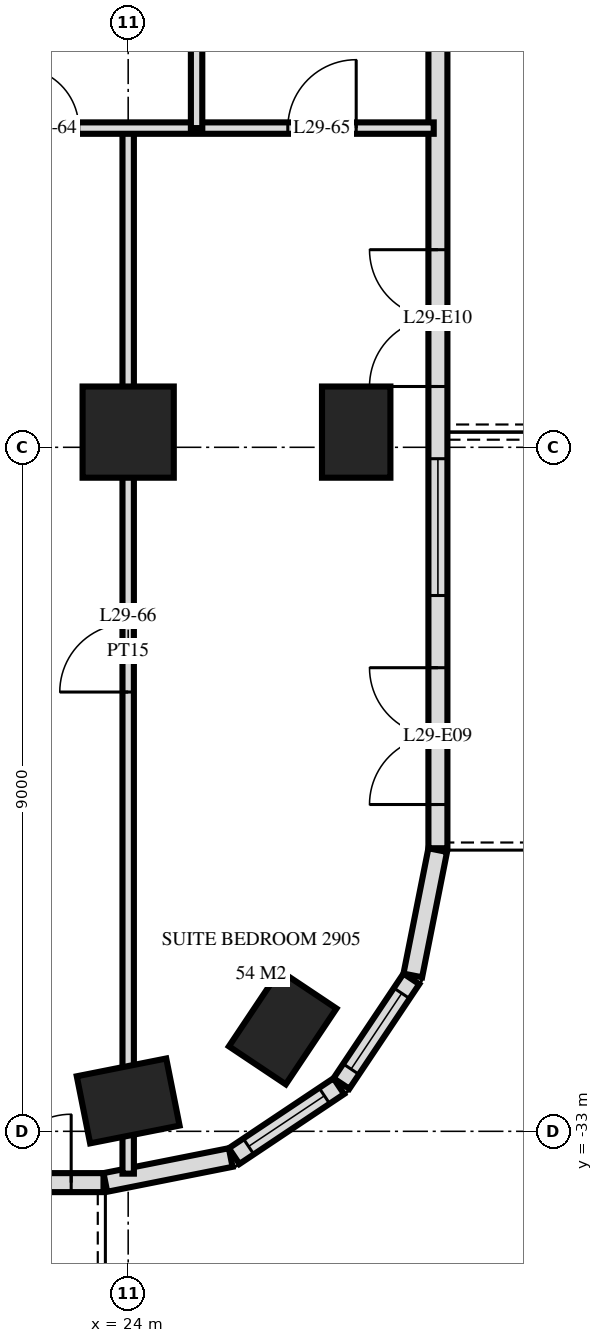
"""IFC4 building model, lengths in metres.
Left out: names, types, materials, properties, quantities, classifications, styles, units other than length and angle.
Written with IfcOpenShell. Run it as: python <this file> out.ifc"""

import sys

from ifc_helpers import new_model, si_unit, direction, frame, frame_2d, origin, origin_2d, place, context, subcontext, project, spatial, rectangle, extrude, element, fill, save


model = new_model("IFC4")
c1 = context("Model", 3, precision=1e-05, world=origin(), true_north=direction((0.0, 1.0)))
c2 = subcontext(c1, "Body", "Model", "MODEL_VIEW")
j1 = project(units=[si_unit("LENGTHUNIT", "METRE"), si_unit("PLANEANGLEUNIT", "RADIAN")], contexts=[c1])
p1 = place(None, origin())
s1 = spatial("IfcSite", under=j1, at=p1, CompositionType="ELEMENT")
p2 = place(p1, origin())
s2 = spatial("IfcBuilding", under=s1, at=p2, CompositionType="ELEMENT")
p3 = place(p2, frame((0.0, 0.0, 116.4)))
s3 = spatial("IfcBuildingStorey", under=s2, at=p3, CompositionType="ELEMENT", Elevation=116.4)
p4 = place(p3, frame((24.0, -32.6, 0.0), z_axis=(0.0, 0.0, 1.0), x_axis=(0.980792089743, 0.195056086032, 0.0)))
e1 = element("IfcColumn", 1, at=p4, inside=s3, PredefinedType="COLUMN", context=c2, shape_type="SweptSolid", body=[
    extrude(rectangle(XDim=1.2, YDim=0.9, at=origin_2d()), origin(), (0.0, 0.0, 1.0), 3.6),
])
p5 = place(p3, frame((24.0, -23.8, 0.0), z_axis=(0.0, 0.0, 1.0), x_axis=(1.0, 0.0, 0.0)))
e2 = element("IfcColumn", 2, at=p5, inside=s3, PredefinedType="COLUMN", context=c2, shape_type="SweptSolid", body=[
    extrude(rectangle(XDim=1.2, YDim=1.2, at=origin_2d()), origin(), (0.0, 0.0, 1.0), 3.6),
])
for number, where, z_axis, x_axis in (
    (3, (26.033, -31.633, 0.0), (0.0, 0.0, 1.0), (0.556, 0.831, 0.0)),
    (4, (27.0, -23.8, 0.0), (0.0, 0.0, 1.0), (0.0, 1.0, 0.0)),
):
    element("IfcColumn", number, at=place(p3, frame(where, z_axis=z_axis, x_axis=x_axis)), inside=s3, PredefinedType="COLUMN", context=c2, shape_type="SweptSolid", body=[
        extrude(rectangle(XDim=1.2, YDim=0.9, at=origin_2d()), origin(), (0.0, 0.0, 1.0), 3.6),
    ])
p6 = place(p3, frame((-23.675, -33.675, 0.0), z_axis=(0.0, 0.0, 1.0), x_axis=(1.0, 0.0, 0.0)))
e5 = element("IfcWall", 5, at=p6, inside=s3, PredefinedType="SOLIDWALL", context=c2, shape_type="SweptSolid", body=[
    extrude(rectangle(XDim=47.351, YDim=0.25, at=frame_2d((23.675, 0.0))), origin(), (0.0, 0.0, 1.0), 3.32),
])
p7 = place(p6, frame((0.275, 0.0, 0.3)))
e6 = element("IfcOpeningElement", 6, at=p7, cuts=e5, PredefinedType="OPENING", context=c2, shape_type="SweptSolid", body=[
    extrude(rectangle(XDim=2.4, YDim=2.1, at=frame_2d((1.2, 1.05))), frame((0.0, 0.135, 0.0), z_axis=(0.0, -1.0, 0.0), x_axis=(1.0, 0.0, 0.0)), (0.0, 0.0, 1.0), 0.27),
])
p8 = place(p6, frame((3.425, 0.0, 0.0)))
e7 = element("IfcOpeningElement", 7, at=p8, cuts=e5, PredefinedType="OPENING", context=c2, shape_type="SweptSolid", body=[
    extrude(rectangle(XDim=1.8, YDim=2.4, at=frame_2d((0.9, 1.2))), frame((0.0, 0.135, 0.0), z_axis=(0.0, -1.0, 0.0), x_axis=(1.0, 0.0, 0.0)), (0.0, 0.0, 1.0), 0.27),
])
p9 = place(p6, frame((5.975, 0.0, 0.3)))
e8 = element("IfcOpeningElement", 8, at=p9, cuts=e5, PredefinedType="OPENING", context=c2, shape_type="SweptSolid", body=[
    extrude(rectangle(XDim=2.4, YDim=2.1, at=frame_2d((1.2, 1.05))), frame((0.0, 0.135, 0.0), z_axis=(0.0, -1.0, 0.0), x_axis=(1.0, 0.0, 0.0)), (0.0, 0.0, 1.0), 0.27),
])
p10 = place(p6, frame((9.275, 0.0, 0.0)))
e9 = element("IfcOpeningElement", 9, at=p10, cuts=e5, PredefinedType="OPENING", context=c2, shape_type="SweptSolid", body=[
    extrude(rectangle(XDim=1.8, YDim=2.4, at=frame_2d((0.9, 1.2))), frame((0.0, 0.135, 0.0), z_axis=(0.0, -1.0, 0.0), x_axis=(1.0, 0.0, 0.0)), (0.0, 0.0, 1.0), 0.27),
])
p11 = place(p6, frame((12.275, 0.0, 0.0)))
e10 = element("IfcOpeningElement", 10, at=p11, cuts=e5, PredefinedType="OPENING", context=c2, shape_type="SweptSolid", body=[
    extrude(rectangle(XDim=1.8, YDim=2.4, at=frame_2d((0.9, 1.2))), frame((0.0, 0.135, 0.0), z_axis=(0.0, -1.0, 0.0), x_axis=(1.0, 0.0, 0.0)), (0.0, 0.0, 1.0), 0.27),
])
p12 = place(p6, frame((14.975, 0.0, 0.3)))
e11 = element("IfcOpeningElement", 11, at=p12, cuts=e5, PredefinedType="OPENING", context=c2, shape_type="SweptSolid", body=[
    extrude(rectangle(XDim=2.4, YDim=2.1, at=frame_2d((1.2, 1.05))), frame((0.0, 0.135, 0.0), z_axis=(0.0, -1.0, 0.0), x_axis=(1.0, 0.0, 0.0)), (0.0, 0.0, 1.0), 0.27),
])
p13 = place(p6, frame((17.975, 0.0, 0.3)))
e12 = element("IfcOpeningElement", 12, at=p13, cuts=e5, PredefinedType="OPENING", context=c2, shape_type="SweptSolid", body=[
    extrude(rectangle(XDim=2.4, YDim=2.1, at=frame_2d((1.2, 1.05))), frame((0.0, 0.135, 0.0), z_axis=(0.0, -1.0, 0.0), x_axis=(1.0, 0.0, 0.0)), (0.0, 0.0, 1.0), 0.27),
])
p14 = place(p6, frame((21.275, 0.0, 0.0)))
e13 = element("IfcOpeningElement", 13, at=p14, cuts=e5, PredefinedType="OPENING", context=c2, shape_type="SweptSolid", body=[
    extrude(rectangle(XDim=1.8, YDim=2.4, at=frame_2d((0.9, 1.2))), frame((0.0, 0.135, 0.0), z_axis=(0.0, -1.0, 0.0), x_axis=(1.0, 0.0, 0.0)), (0.0, 0.0, 1.0), 0.27),
])
p15 = place(p6, frame((24.275, 0.0, 0.0)))
e14 = element("IfcOpeningElement", 14, at=p15, cuts=e5, PredefinedType="OPENING", context=c2, shape_type="SweptSolid", body=[
    extrude(rectangle(XDim=1.8, YDim=2.4, at=frame_2d((0.9, 1.2))), frame((0.0, 0.135, 0.0), z_axis=(0.0, -1.0, 0.0), x_axis=(1.0, 0.0, 0.0)), (0.0, 0.0, 1.0), 0.27),
])
p16 = place(p6, frame((26.975, 0.0, 0.3)))
e15 = element("IfcOpeningElement", 15, at=p16, cuts=e5, PredefinedType="OPENING", context=c2, shape_type="SweptSolid", body=[
    extrude(rectangle(XDim=2.4, YDim=2.1, at=frame_2d((1.2, 1.05))), frame((0.0, 0.135, 0.0), z_axis=(0.0, -1.0, 0.0), x_axis=(1.0, 0.0, 0.0)), (0.0, 0.0, 1.0), 0.27),
])
p17 = place(p6, frame((30.275, 0.0, 0.0)))
e16 = element("IfcOpeningElement", 16, at=p17, cuts=e5, PredefinedType="OPENING", context=c2, shape_type="SweptSolid", body=[
    extrude(rectangle(XDim=1.8, YDim=2.4, at=frame_2d((0.9, 1.2))), frame((0.0, 0.135, 0.0), z_axis=(0.0, -1.0, 0.0), x_axis=(1.0, 0.0, 0.0)), (0.0, 0.0, 1.0), 0.27),
])
p18 = place(p6, frame((32.975, 0.0, 0.3)))
e17 = element("IfcOpeningElement", 17, at=p18, cuts=e5, PredefinedType="OPENING", context=c2, shape_type="SweptSolid", body=[
    extrude(rectangle(XDim=2.4, YDim=2.1, at=frame_2d((1.2, 1.05))), frame((0.0, 0.135, 0.0), z_axis=(0.0, -1.0, 0.0), x_axis=(1.0, 0.0, 0.0)), (0.0, 0.0, 1.0), 0.27),
])
p19 = place(p6, frame((35.975, 0.0, 0.3)))
e18 = element("IfcOpeningElement", 18, at=p19, cuts=e5, PredefinedType="OPENING", context=c2, shape_type="SweptSolid", body=[
    extrude(rectangle(XDim=2.4, YDim=2.1, at=frame_2d((1.2, 1.05))), frame((0.0, 0.135, 0.0), z_axis=(0.0, -1.0, 0.0), x_axis=(1.0, 0.0, 0.0)), (0.0, 0.0, 1.0), 0.27),
])
p20 = place(p6, frame((39.275, 0.0, 0.0)))
e19 = element("IfcOpeningElement", 19, at=p20, cuts=e5, PredefinedType="OPENING", context=c2, shape_type="SweptSolid", body=[
    extrude(rectangle(XDim=1.8, YDim=2.4, at=frame_2d((0.9, 1.2))), frame((0.0, 0.135, 0.0), z_axis=(0.0, -1.0, 0.0), x_axis=(1.0, 0.0, 0.0)), (0.0, 0.0, 1.0), 0.27),
])
p21 = place(p6, frame((41.975, 0.0, 0.3)))
e20 = element("IfcOpeningElement", 20, at=p21, cuts=e5, PredefinedType="OPENING", context=c2, shape_type="SweptSolid", body=[
    extrude(rectangle(XDim=2.4, YDim=2.1, at=frame_2d((1.2, 1.05))), frame((0.0, 0.135, 0.0), z_axis=(0.0, -1.0, 0.0), x_axis=(1.0, 0.0, 0.0)), (0.0, 0.0, 1.0), 0.27),
])
p22 = place(p6, frame((45.125, 0.0, 0.0)))
e21 = element("IfcOpeningElement", 21, at=p22, cuts=e5, PredefinedType="OPENING", context=c2, shape_type="SweptSolid", body=[
    extrude(rectangle(XDim=1.8, YDim=2.4, at=frame_2d((0.9, 1.2))), frame((0.0, 0.135, 0.0), z_axis=(0.0, -1.0, 0.0), x_axis=(1.0, 0.0, 0.0)), (0.0, 0.0, 1.0), 0.27),
])
p23 = place(p3, frame((23.7, -33.673, 0.0), z_axis=(0.0, 0.0, 1.0), x_axis=(0.980775640221, 0.19513878023, 0.0)))
e22 = element("IfcWall", 22, at=p23, inside=s3, PredefinedType="SOLIDWALL", context=c2, shape_type="SweptSolid", body=[
    extrude(rectangle(XDim=1.681, YDim=0.25, at=frame_2d((0.841, 0.0))), origin(), (0.0, 0.0, 1.0), 3.32),
])
p24 = place(p3, frame((25.394, -33.326, 0.0), z_axis=(0.0, 0.0, 1.0), x_axis=(0.831482937015, 0.55555029066, 0.0)))
e23 = element("IfcWall", 23, at=p24, inside=s3, PredefinedType="SOLIDWALL", context=c2, shape_type="SweptSolid", body=[
    extrude(rectangle(XDim=1.656, YDim=0.25, at=frame_2d((0.828, 0.0))), origin(), (0.0, 0.0, 1.0), 3.32),
])
p25 = place(p24, frame((0.228, 0.0, 0.9)))
e24 = element("IfcOpeningElement", 24, at=p25, cuts=e23, PredefinedType="OPENING", context=c2, shape_type="SweptSolid", body=[
    extrude(rectangle(XDim=1.2, YDim=1.5, at=frame_2d((0.6, 0.75))), frame((0.0, 0.135, 0.0), z_axis=(0.0, -1.0, 0.0), x_axis=(1.0, 0.0, 0.0)), (0.0, 0.0, 1.0), 0.27),
])
p26 = place(p3, frame((26.806, -32.371, 0.0), z_axis=(0.0, 0.0, 1.0), x_axis=(0.55555029066, 0.831482937015, 0.0)))
e25 = element("IfcWall", 25, at=p26, inside=s3, PredefinedType="SOLIDWALL", context=c2, shape_type="SweptSolid", body=[
    extrude(rectangle(XDim=1.656, YDim=0.25, at=frame_2d((0.828, 0.0))), origin(), (0.0, 0.0, 1.0), 3.32),
])
p27 = place(p26, frame((0.228, 0.0, 0.9)))
e26 = element("IfcOpeningElement", 26, at=p27, cuts=e25, PredefinedType="OPENING", context=c2, shape_type="SweptSolid", body=[
    extrude(rectangle(XDim=1.2, YDim=1.5, at=frame_2d((0.6, 0.75))), frame((0.0, 0.135, 0.0), z_axis=(0.0, -1.0, 0.0), x_axis=(1.0, 0.0, 0.0)), (0.0, 0.0, 1.0), 0.27),
])
p28 = place(p3, frame((27.745, -30.949, 0.0), z_axis=(0.0, 0.0, 1.0), x_axis=(0.194999110559, 0.980803419081, 0.0)))
e27 = element("IfcWall", 27, at=p28, inside=s3, PredefinedType="SOLIDWALL", context=c2, shape_type="SweptSolid", body=[
    extrude(rectangle(XDim=1.681, YDim=0.25, at=frame_2d((0.841, 0.0))), origin(), (0.0, 0.0, 1.0), 3.32),
])
p29 = place(p3, frame((28.075, -29.275, 0.0), z_axis=(0.0, 0.0, 1.0), x_axis=(0.0, 1.0, 0.0)))
e28 = element("IfcWall", 28, at=p29, inside=s3, PredefinedType="SOLIDWALL", context=c2, shape_type="SweptSolid", body=[
    extrude(rectangle(XDim=25.951, YDim=0.25, at=frame_2d((12.975, 0.0))), origin(), (0.0, 0.0, 1.0), 3.32),
])
p30 = place(p29, frame((0.575, 0.0, 0.0)))
e29 = element("IfcOpeningElement", 29, at=p30, cuts=e28, PredefinedType="OPENING", context=c2, shape_type="SweptSolid", body=[
    extrude(rectangle(XDim=1.8, YDim=2.4, at=frame_2d((0.9, 1.2))), frame((0.0, 0.135, 0.0), z_axis=(0.0, -1.0, 0.0), x_axis=(1.0, 0.0, 0.0)), (0.0, 0.0, 1.0), 0.27),
])
p31 = place(p29, frame((3.325, 0.0, 0.3)))
e30 = element("IfcOpeningElement", 30, at=p31, cuts=e28, PredefinedType="OPENING", context=c2, shape_type="SweptSolid", body=[
    extrude(rectangle(XDim=1.8, YDim=2.1, at=frame_2d((0.9, 1.05))), frame((0.0, 0.135, 0.0), z_axis=(0.0, -1.0, 0.0), x_axis=(1.0, 0.0, 0.0)), (0.0, 0.0, 1.0), 0.27),
])
p32 = place(p29, frame((6.075, 0.0, 0.0)))
e31 = element("IfcOpeningElement", 31, at=p32, cuts=e28, PredefinedType="OPENING", context=c2, shape_type="SweptSolid", body=[
    extrude(rectangle(XDim=1.8, YDim=2.4, at=frame_2d((0.9, 1.2))), frame((0.0, 0.135, 0.0), z_axis=(0.0, -1.0, 0.0), x_axis=(1.0, 0.0, 0.0)), (0.0, 0.0, 1.0), 0.27),
])
p33 = place(p29, frame((17.125, 0.0, 0.0)))
e32 = element("IfcOpeningElement", 32, at=p33, cuts=e28, PredefinedType="OPENING", context=c2, shape_type="SweptSolid", body=[
    extrude(rectangle(XDim=1.8, YDim=2.4, at=frame_2d((0.9, 1.2))), frame((0.0, 0.135, 0.0), z_axis=(0.0, -1.0, 0.0), x_axis=(1.0, 0.0, 0.0)), (0.0, 0.0, 1.0), 0.27),
])
p34 = place(p3, frame((24.9, -19.8, 0.0), z_axis=(0.0, 0.0, 1.0), x_axis=(0.0, 1.0, 0.0)))
e33 = element("IfcWall", 33, at=p34, inside=s3, PredefinedType="PARTITIONING", context=c2, shape_type="SweptSolid", body=[
    extrude(rectangle(XDim=3.0, YDim=0.15, at=frame_2d((1.5, 0.0))), origin(), (0.0, 0.0, 1.0), 3.32),
])
p35 = place(p3, frame((24.0, -33.557, 0.0), z_axis=(0.0, 0.0, 1.0), x_axis=(0.0, 1.0, 0.0)))
e34 = element("IfcWall", 34, at=p35, inside=s3, PredefinedType="PARTITIONING", context=c2, shape_type="SweptSolid", body=[
    extrude(rectangle(XDim=13.757, YDim=0.15, at=frame_2d((6.878, 0.0))), origin(), (0.0, 0.0, 1.0), 3.32),
])
p36 = place(p35, frame((6.337, 0.0, 0.0)))
e35 = element("IfcOpeningElement", 35, at=p36, cuts=e34, PredefinedType="OPENING", context=c2, shape_type="SweptSolid", body=[
    extrude(rectangle(XDim=0.9, YDim=2.1, at=frame_2d((0.45, 1.05))), frame((0.0, 0.085, 0.0), z_axis=(0.0, -1.0, 0.0), x_axis=(1.0, 0.0, 0.0)), (0.0, 0.0, 1.0), 0.17),
])
p37 = place(p3, frame((21.9, -19.8, 0.0), z_axis=(0.0, 0.0, 1.0), x_axis=(1.0, 0.0, 0.0)))
e36 = element("IfcWall", 36, at=p37, inside=s3, PredefinedType="PARTITIONING", context=c2, shape_type="SweptSolid", body=[
    extrude(rectangle(XDim=6.12, YDim=0.15, at=frame_2d((3.06, 0.0))), origin(), (0.0, 0.0, 1.0), 3.32),
])
p38 = place(p37, frame((0.65, 0.0, 0.0)))
e37 = element("IfcOpeningElement", 37, at=p38, cuts=e36, PredefinedType="OPENING", context=c2, shape_type="SweptSolid", body=[
    extrude(rectangle(XDim=0.8, YDim=2.1, at=frame_2d((0.4, 1.05))), frame((0.0, 0.085, 0.0), z_axis=(0.0, -1.0, 0.0), x_axis=(1.0, 0.0, 0.0)), (0.0, 0.0, 1.0), 0.17),
])
p39 = place(p37, frame((4.2, 0.0, 0.0)))
e38 = element("IfcOpeningElement", 38, at=p39, cuts=e36, PredefinedType="OPENING", context=c2, shape_type="SweptSolid", body=[
    extrude(rectangle(XDim=0.9, YDim=2.1, at=frame_2d((0.45, 1.05))), frame((0.0, 0.085, 0.0), z_axis=(0.0, -1.0, 0.0), x_axis=(1.0, 0.0, 0.0)), (0.0, 0.0, 1.0), 0.17),
])
p40 = place(p25, origin())
e39 = element("IfcWindow", 39, at=p40, inside=s3, PartitioningType="SINGLE_PANEL", PredefinedType="WINDOW", context=c2, shape_type="SweptSolid", body=[
    extrude(rectangle(XDim=1.2, YDim=1.5, at=frame_2d((0.6, 0.75))), frame((0.0, 0.03, 0.0), z_axis=(0.0, -1.0, 0.0), x_axis=(1.0, 0.0, 0.0)), (0.0, 0.0, 1.0), 0.06),
])
fill(e24, e39)
p41 = place(p27, origin())
e40 = element("IfcWindow", 40, at=p41, inside=s3, PartitioningType="SINGLE_PANEL", PredefinedType="WINDOW", context=c2, shape_type="SweptSolid", body=[
    extrude(rectangle(XDim=1.2, YDim=1.5, at=frame_2d((0.6, 0.75))), frame((0.0, 0.03, 0.0), z_axis=(0.0, -1.0, 0.0), x_axis=(1.0, 0.0, 0.0)), (0.0, 0.0, 1.0), 0.06),
])
fill(e26, e40)
p42 = place(p22, origin())
e41 = element("IfcDoor", 41, at=p42, inside=s3, OperationType="DOUBLE_DOOR_SINGLE_SWING", PredefinedType="DOOR", context=c2, shape_type="SweptSolid", body=[
    extrude(rectangle(XDim=1.8, YDim=2.4, at=frame_2d((0.9, 1.2))), frame((0.0, 0.025, 0.0), z_axis=(0.0, -1.0, 0.0), x_axis=(1.0, 0.0, 0.0)), (0.0, 0.0, 1.0), 0.05),
])
fill(e21, e41)
p43 = place(p30, origin())
e42 = element("IfcDoor", 42, at=p43, inside=s3, OperationType="DOUBLE_DOOR_SINGLE_SWING", PredefinedType="DOOR", context=c2, shape_type="SweptSolid", body=[
    extrude(rectangle(XDim=1.8, YDim=2.4, at=frame_2d((0.9, 1.2))), frame((0.0, 0.025, 0.0), z_axis=(0.0, -1.0, 0.0), x_axis=(1.0, 0.0, 0.0)), (0.0, 0.0, 1.0), 0.05),
])
fill(e29, e42)
p44 = place(p31, origin())
e43 = element("IfcWindow", 43, at=p44, inside=s3, PartitioningType="SINGLE_PANEL", PredefinedType="WINDOW", context=c2, shape_type="SweptSolid", body=[
    extrude(rectangle(XDim=1.8, YDim=2.1, at=frame_2d((0.9, 1.05))), frame((0.0, 0.03, 0.0), z_axis=(0.0, -1.0, 0.0), x_axis=(1.0, 0.0, 0.0)), (0.0, 0.0, 1.0), 0.06),
])
fill(e30, e43)
p45 = place(p32, origin())
e44 = element("IfcDoor", 44, at=p45, inside=s3, OperationType="DOUBLE_DOOR_SINGLE_SWING", PredefinedType="DOOR", context=c2, shape_type="SweptSolid", body=[
    extrude(rectangle(XDim=1.8, YDim=2.4, at=frame_2d((0.9, 1.2))), frame((0.0, 0.025, 0.0), z_axis=(0.0, -1.0, 0.0), x_axis=(1.0, 0.0, 0.0)), (0.0, 0.0, 1.0), 0.05),
])
fill(e31, e44)
p46 = place(p38, origin())
e45 = element("IfcDoor", 45, at=p46, inside=s3, OperationType="SINGLE_SWING_RIGHT", PredefinedType="DOOR", context=c2, shape_type="SweptSolid", body=[
    extrude(rectangle(XDim=0.8, YDim=2.1, at=frame_2d((0.4, 1.05))), frame((0.0, 0.025, 0.0), z_axis=(0.0, -1.0, 0.0), x_axis=(1.0, 0.0, 0.0)), (0.0, 0.0, 1.0), 0.05),
])
fill(e37, e45)
p47 = place(p39, origin())
e46 = element("IfcDoor", 46, at=p47, inside=s3, OperationType="SINGLE_SWING_LEFT", PredefinedType="DOOR", context=c2, shape_type="SweptSolid", body=[
    extrude(rectangle(XDim=0.9, YDim=2.1, at=frame_2d((0.45, 1.05))), frame((0.0, 0.025, 0.0), z_axis=(0.0, -1.0, 0.0), x_axis=(1.0, 0.0, 0.0)), (0.0, 0.0, 1.0), 0.05),
])
fill(e38, e46)
p48 = place(p36, origin())
e47 = element("IfcDoor", 47, at=p48, inside=s3, OperationType="SINGLE_SWING_RIGHT", PredefinedType="DOOR", context=c2, shape_type="SweptSolid", body=[
    extrude(rectangle(XDim=0.9, YDim=2.1, at=frame_2d((0.45, 1.05))), frame((0.0, 0.025, 0.0), z_axis=(0.0, -1.0, 0.0), x_axis=(1.0, 0.0, 0.0)), (0.0, 0.0, 1.0), 0.05),
])
fill(e35, e47)
save(model, sys.argv[1])
